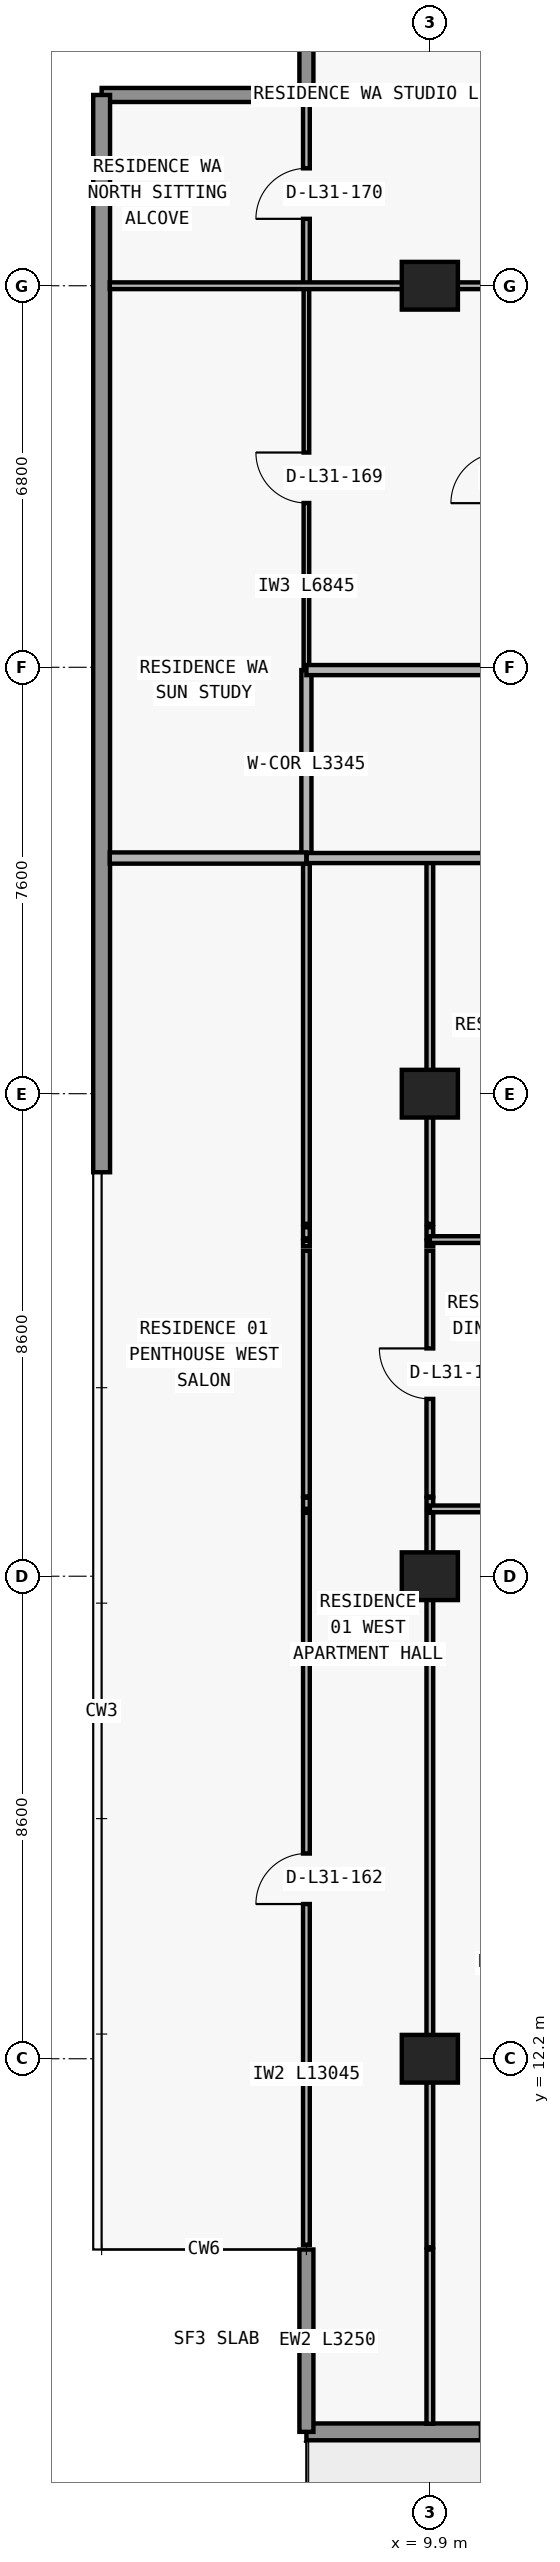
"""IFC4 building model, lengths in metres.
Left out: names, types, materials, properties, quantities, classifications, styles, units other than length and angle.
Written with IfcOpenShell. Run it as: python <this file> out.ifc"""

import sys

from ifc_helpers import new_model, si_unit, direction, frame, frame_2d, origin, origin_2d, place, context, subcontext, project, spatial, rectangle, extrude, element, fill, save


model = new_model("IFC4")
c1 = context("Model", 3, precision=1e-05, world=origin(), true_north=direction((0.0, 1.0)))
c2 = subcontext(c1, "Body", "Model", "MODEL_VIEW")
j1 = project(units=[si_unit("LENGTHUNIT", "METRE"), si_unit("PLANEANGLEUNIT", "RADIAN")], contexts=[c1])
p1 = place(None, origin())
s1 = spatial("IfcSite", under=j1, at=p1, CompositionType="ELEMENT")
p2 = place(p1, origin())
s2 = spatial("IfcBuilding", under=s1, at=p2, CompositionType="ELEMENT")
p3 = place(p2, frame((0.0, 0.0, 115.8)))
s3 = spatial("IfcBuildingStorey", under=s2, at=p3, CompositionType="ELEMENT", Elevation=115.8)
for number, where, z_axis, x_axis in (
    (1, (9.9, 12.2, 0.0), (0.0, 0.0, 1.0), (1.0, 0.0, 0.0)),
    (2, (9.9, 20.8, 0.0), (0.0, 0.0, 1.0), (1.0, 0.0, 0.0)),
    (3, (9.9, 29.4, 0.0), (0.0, 0.0, 1.0), (1.0, 0.0, 0.0)),
    (4, (9.9, 43.8, 0.0), (0.0, 0.0, 1.0), (1.0, 0.0, 0.0)),
):
    element("IfcColumn", number, at=place(p3, frame(where, z_axis=z_axis, x_axis=x_axis)), inside=s3, PredefinedType="COLUMN", context=c2, shape_type="SweptSolid", body=[
        extrude(rectangle(XDim=1.0, YDim=0.85, at=origin_2d()), origin(), (0.0, 0.0, 1.0), 3.05),
    ])
p4 = place(p3, frame((70.1, 5.55, 0.0), z_axis=(0.0, 0.0, 1.0), x_axis=(-1.0, 0.0, 0.0)))
e5 = element("IfcWall", 5, at=p4, inside=s3, PredefinedType="STANDARD", context=c2, shape_type="SweptSolid", body=[
    extrude(rectangle(XDim=62.4, YDim=0.3, at=frame_2d((31.2, 0.0))), origin(), (0.0, 0.0, 1.0), 3.05),
])
p5 = place(p4, frame((57.29, 0.0, 0.0)))
e6 = element("IfcOpeningElement", 6, at=p5, cuts=e5, PredefinedType="OPENING", context=c2, shape_type="SweptSolid", body=[
    extrude(rectangle(XDim=2.0, YDim=2.3, at=frame_2d((1.0, 1.15))), frame((0.0, 0.16, 0.0), z_axis=(0.0, -1.0, 0.0), x_axis=(1.0, 0.0, 0.0)), (0.0, 0.0, 1.0), 0.32),
])
p6 = place(p4, frame((52.61, 0.0, 0.65)))
e7 = element("IfcOpeningElement", 7, at=p6, cuts=e5, PredefinedType="OPENING", context=c2, shape_type="SweptSolid", body=[
    extrude(rectangle(XDim=2.6, YDim=1.85, at=frame_2d((1.3, 0.925))), frame((0.0, 0.16, 0.0), z_axis=(0.0, -1.0, 0.0), x_axis=(1.0, 0.0, 0.0)), (0.0, 0.0, 1.0), 0.32),
])
p7 = place(p4, frame((46.5, 0.0, 0.85)))
e8 = element("IfcOpeningElement", 8, at=p7, cuts=e5, PredefinedType="OPENING", context=c2, shape_type="SweptSolid", body=[
    extrude(rectangle(XDim=2.2, YDim=1.55, at=frame_2d((1.1, 0.775))), frame((0.0, 0.16, 0.0), z_axis=(0.0, -1.0, 0.0), x_axis=(1.0, 0.0, 0.0)), (0.0, 0.0, 1.0), 0.32),
])
p8 = place(p4, frame((40.49, 0.0, 0.0)))
e9 = element("IfcOpeningElement", 9, at=p8, cuts=e5, PredefinedType="OPENING", context=c2, shape_type="SweptSolid", body=[
    extrude(rectangle(XDim=2.0, YDim=2.3, at=frame_2d((1.0, 1.15))), frame((0.0, 0.16, 0.0), z_axis=(0.0, -1.0, 0.0), x_axis=(1.0, 0.0, 0.0)), (0.0, 0.0, 1.0), 0.32),
])
p9 = place(p4, frame((35.81, 0.0, 0.65)))
e10 = element("IfcOpeningElement", 10, at=p9, cuts=e5, PredefinedType="OPENING", context=c2, shape_type="SweptSolid", body=[
    extrude(rectangle(XDim=2.6, YDim=1.85, at=frame_2d((1.3, 0.925))), frame((0.0, 0.16, 0.0), z_axis=(0.0, -1.0, 0.0), x_axis=(1.0, 0.0, 0.0)), (0.0, 0.0, 1.0), 0.32),
])
p10 = place(p4, frame((30.1, 0.0, 0.85)))
e11 = element("IfcOpeningElement", 11, at=p10, cuts=e5, PredefinedType="OPENING", context=c2, shape_type="SweptSolid", body=[
    extrude(rectangle(XDim=2.2, YDim=1.55, at=frame_2d((1.1, 0.775))), frame((0.0, 0.16, 0.0), z_axis=(0.0, -1.0, 0.0), x_axis=(1.0, 0.0, 0.0)), (0.0, 0.0, 1.0), 0.32),
])
p11 = place(p4, frame((24.426, 0.0, 0.0)))
e12 = element("IfcOpeningElement", 12, at=p11, cuts=e5, PredefinedType="OPENING", context=c2, shape_type="SweptSolid", body=[
    extrude(rectangle(XDim=2.0, YDim=2.3, at=frame_2d((1.0, 1.15))), frame((0.0, 0.16, 0.0), z_axis=(0.0, -1.0, 0.0), x_axis=(1.0, 0.0, 0.0)), (0.0, 0.0, 1.0), 0.32),
])
p12 = place(p4, frame((20.126, 0.0, 0.85)))
e13 = element("IfcOpeningElement", 13, at=p12, cuts=e5, PredefinedType="OPENING", context=c2, shape_type="SweptSolid", body=[
    extrude(rectangle(XDim=2.2, YDim=1.55, at=frame_2d((1.1, 0.775))), frame((0.0, 0.16, 0.0), z_axis=(0.0, -1.0, 0.0), x_axis=(1.0, 0.0, 0.0)), (0.0, 0.0, 1.0), 0.32),
])
p13 = place(p4, frame((15.69, 0.0, 0.0)))
e14 = element("IfcOpeningElement", 14, at=p13, cuts=e5, PredefinedType="OPENING", context=c2, shape_type="SweptSolid", body=[
    extrude(rectangle(XDim=2.0, YDim=2.3, at=frame_2d((1.0, 1.15))), frame((0.0, 0.16, 0.0), z_axis=(0.0, -1.0, 0.0), x_axis=(1.0, 0.0, 0.0)), (0.0, 0.0, 1.0), 0.32),
])
p14 = place(p4, frame((11.59, 0.0, 0.85)))
e15 = element("IfcOpeningElement", 15, at=p14, cuts=e5, PredefinedType="OPENING", context=c2, shape_type="SweptSolid", body=[
    extrude(rectangle(XDim=1.8, YDim=1.55, at=frame_2d((0.9, 0.775))), frame((0.0, 0.16, 0.0), z_axis=(0.0, -1.0, 0.0), x_axis=(1.0, 0.0, 0.0)), (0.0, 0.0, 1.0), 0.32),
])
p15 = place(p4, frame((7.626, 0.0, 0.0)))
e16 = element("IfcOpeningElement", 16, at=p15, cuts=e5, PredefinedType="OPENING", context=c2, shape_type="SweptSolid", body=[
    extrude(rectangle(XDim=2.0, YDim=2.3, at=frame_2d((1.0, 1.15))), frame((0.0, 0.16, 0.0), z_axis=(0.0, -1.0, 0.0), x_axis=(1.0, 0.0, 0.0)), (0.0, 0.0, 1.0), 0.32),
])
p16 = place(p4, frame((3.326, 0.0, 0.85)))
e17 = element("IfcOpeningElement", 17, at=p16, cuts=e5, PredefinedType="OPENING", context=c2, shape_type="SweptSolid", body=[
    extrude(rectangle(XDim=2.2, YDim=1.55, at=frame_2d((1.1, 0.775))), frame((0.0, 0.16, 0.0), z_axis=(0.0, -1.0, 0.0), x_axis=(1.0, 0.0, 0.0)), (0.0, 0.0, 1.0), 0.32),
])
p17 = place(p3, frame((7.7, 8.8, 0.0), z_axis=(0.0, 0.0, 1.0), x_axis=(0.0, -1.0, 0.0)))
e18 = element("IfcWall", 18, at=p17, inside=s3, PredefinedType="ELEMENTEDWALL", context=c2, shape_type="SweptSolid", body=[
    extrude(rectangle(XDim=3.25, YDim=0.25, at=frame_2d((1.625, 0.0))), origin(), (0.0, 0.0, 1.0), 3.05),
])
p18 = place(p3, frame((4.05, 47.2, 0.0), z_axis=(0.0, 0.0, 1.0), x_axis=(1.0, 0.0, 0.0)))
e19 = element("IfcWall", 19, at=p18, inside=s3, PredefinedType="ELEMENTEDWALL", context=c2, shape_type="SweptSolid", body=[
    extrude(rectangle(XDim=3.65, YDim=0.25, at=frame_2d((1.825, 0.0))), origin(), (0.0, 0.0, 1.0), 3.05),
])
p19 = place(p3, frame((7.7, 47.2, 0.0), z_axis=(0.0, 0.0, 1.0), x_axis=(0.0, 1.0, 0.0)))
e20 = element("IfcWall", 20, at=p19, inside=s3, PredefinedType="ELEMENTEDWALL", context=c2, shape_type="SweptSolid", body=[
    extrude(rectangle(XDim=3.25, YDim=0.25, at=frame_2d((1.625, 0.0))), origin(), (0.0, 0.0, 1.0), 3.05),
])
p20 = place(p3, frame((4.05, 28.0, 0.0), z_axis=(0.0, 0.0, 1.0), x_axis=(0.0, 1.0, 0.0)))
e21 = element("IfcWall", 21, at=p20, inside=s3, PredefinedType="STANDARD", context=c2, shape_type="SweptSolid", body=[
    extrude(rectangle(XDim=19.2, YDim=0.3, at=frame_2d((9.6, 0.0))), origin(), (0.0, 0.0, 1.0), 3.05),
])
p21 = place(p3, frame((7.7, 8.885, 0.0), z_axis=(0.0, 0.0, 1.0), x_axis=(0.0, 1.0, 0.0)))
e22 = element("IfcWall", 22, at=p21, inside=s3, PredefinedType="PARTITIONING", context=c2, shape_type="SweptSolid", body=[
    extrude(rectangle(XDim=13.045, YDim=0.12, at=frame_2d((6.522, 0.0))), origin(), (0.0, 0.0, 1.0), 3.05),
])
p22 = place(p21, frame((6.073, 0.0, 0.0)))
e23 = element("IfcOpeningElement", 23, at=p22, cuts=e22, PredefinedType="OPENING", context=c2, shape_type="SweptSolid", body=[
    extrude(rectangle(XDim=0.9, YDim=2.15, at=frame_2d((0.45, 1.075))), frame((0.0, 0.07, 0.0), z_axis=(0.0, -1.0, 0.0), x_axis=(1.0, 0.0, 0.0)), (0.0, 0.0, 1.0), 0.14),
])
p23 = place(p3, frame((7.7, 22.0, 0.0), z_axis=(0.0, 0.0, 1.0), x_axis=(0.0, 1.0, 0.0)))
e24 = element("IfcWall", 24, at=p23, inside=s3, PredefinedType="PARTITIONING", context=c2, shape_type="SweptSolid", body=[
    extrude(rectangle(XDim=0.2, YDim=0.12, at=frame_2d((0.1, 0.0))), origin(), (0.0, 0.0, 1.0), 3.05),
])
p24 = place(p3, frame((7.7, 22.22, 0.0), z_axis=(0.0, 0.0, 1.0), x_axis=(0.0, 1.0, 0.0)))
e25 = element("IfcWall", 25, at=p24, inside=s3, PredefinedType="PARTITIONING", context=c2, shape_type="SweptSolid", body=[
    extrude(rectangle(XDim=4.38, YDim=0.12, at=frame_2d((2.19, 0.0))), origin(), (0.0, 0.0, 1.0), 3.05),
])
p25 = place(p3, frame((7.7, 26.68, 0.0), z_axis=(0.0, 0.0, 1.0), x_axis=(0.0, 1.0, 0.0)))
e26 = element("IfcWall", 26, at=p25, inside=s3, PredefinedType="PARTITIONING", context=c2, shape_type="SweptSolid", body=[
    extrude(rectangle(XDim=0.1, YDim=0.12, at=frame_2d((0.05, 0.0))), origin(), (0.0, 0.0, 1.0), 3.05),
])
p26 = place(p3, frame((7.7, 26.82, 0.0), z_axis=(0.0, 0.0, 1.0), x_axis=(0.0, 1.0, 0.0)))
e27 = element("IfcWall", 27, at=p26, inside=s3, PredefinedType="PARTITIONING", context=c2, shape_type="SweptSolid", body=[
    extrude(rectangle(XDim=0.2, YDim=0.12, at=frame_2d((0.1, 0.0))), origin(), (0.0, 0.0, 1.0), 3.05),
])
p27 = place(p3, frame((7.7, 27.08, 0.0), z_axis=(0.0, 0.0, 1.0), x_axis=(0.0, 1.0, 0.0)))
e28 = element("IfcWall", 28, at=p27, inside=s3, PredefinedType="PARTITIONING", context=c2, shape_type="SweptSolid", body=[
    extrude(rectangle(XDim=6.52, YDim=0.12, at=frame_2d((3.26, 0.0))), origin(), (0.0, 0.0, 1.0), 3.05),
])
p28 = place(p3, frame((7.7, 33.605, 0.0), z_axis=(0.0, 0.0, 1.0), x_axis=(0.0, 1.0, 0.0)))
e29 = element("IfcWall", 29, at=p28, inside=s3, PredefinedType="PARTITIONING", context=c2, shape_type="SweptSolid", body=[
    extrude(rectangle(XDim=3.345, YDim=0.18, at=frame_2d((1.672, 0.0))), origin(), (0.0, 0.0, 1.0), 3.05),
])
p29 = place(p3, frame((7.7, 36.955, 0.0), z_axis=(0.0, 0.0, 1.0), x_axis=(0.0, 1.0, 0.0)))
e30 = element("IfcWall", 30, at=p29, inside=s3, PredefinedType="MOVABLE", context=c2, shape_type="SweptSolid", body=[
    extrude(rectangle(XDim=6.845, YDim=0.1, at=frame_2d((3.422, 0.0))), origin(), (0.0, 0.0, 1.0), 3.05),
])
p30 = place(p29, frame((2.972, 0.0, 0.0)))
e31 = element("IfcOpeningElement", 31, at=p30, cuts=e30, PredefinedType="OPENING", context=c2, shape_type="SweptSolid", body=[
    extrude(rectangle(XDim=0.9, YDim=2.15, at=frame_2d((0.45, 1.075))), frame((0.0, 0.06, 0.0), z_axis=(0.0, -1.0, 0.0), x_axis=(1.0, 0.0, 0.0)), (0.0, 0.0, 1.0), 0.12),
])
p31 = place(p3, frame((7.7, 43.805, 0.0), z_axis=(0.0, 0.0, 1.0), x_axis=(0.0, 1.0, 0.0)))
e32 = element("IfcWall", 32, at=p31, inside=s3, PredefinedType="PARTITIONING", context=c2, shape_type="SweptSolid", body=[
    extrude(rectangle(XDim=3.275, YDim=0.12, at=frame_2d((1.638, 0.0))), origin(), (0.0, 0.0, 1.0), 3.05),
])
p32 = place(p31, frame((1.188, 0.0, 0.0)))
e33 = element("IfcOpeningElement", 33, at=p32, cuts=e32, PredefinedType="OPENING", context=c2, shape_type="SweptSolid", body=[
    extrude(rectangle(XDim=0.9, YDim=2.15, at=frame_2d((0.45, 1.075))), frame((0.0, 0.07, 0.0), z_axis=(0.0, -1.0, 0.0), x_axis=(1.0, 0.0, 0.0)), (0.0, 0.0, 1.0), 0.14),
])
p33 = place(p3, frame((9.9, 5.695, 0.0), z_axis=(0.0, 0.0, 1.0), x_axis=(0.0, 1.0, 0.0)))
e34 = element("IfcWall", 34, at=p33, inside=s3, PredefinedType="PARTITIONING", context=c2, shape_type="SweptSolid", body=[
    extrude(rectangle(XDim=3.105, YDim=0.12, at=frame_2d((1.552, 0.0))), origin(), (0.0, 0.0, 1.0), 3.05),
])
p34 = place(p3, frame((9.9, 8.84, 0.0), z_axis=(0.0, 0.0, 1.0), x_axis=(0.0, 1.0, 0.0)))
e35 = element("IfcWall", 35, at=p34, inside=s3, PredefinedType="PARTITIONING", context=c2, shape_type="SweptSolid", body=[
    extrude(rectangle(XDim=13.09, YDim=0.12, at=frame_2d((6.545, 0.0))), origin(), (0.0, 0.0, 1.0), 2.174),
])
p35 = place(p3, frame((9.9, 22.0, 0.0), z_axis=(0.0, 0.0, 1.0), x_axis=(0.0, 1.0, 0.0)))
e36 = element("IfcWall", 36, at=p35, inside=s3, PredefinedType="PARTITIONING", context=c2, shape_type="SweptSolid", body=[
    extrude(rectangle(XDim=0.2, YDim=0.12, at=frame_2d((0.1, 0.0))), origin(), (0.0, 0.0, 1.0), 2.174),
])
p36 = place(p3, frame((9.9, 22.22, 0.0), z_axis=(0.0, 0.0, 1.0), x_axis=(0.0, 1.0, 0.0)))
e37 = element("IfcWall", 37, at=p36, inside=s3, PredefinedType="PARTITIONING", context=c2, shape_type="SweptSolid", body=[
    extrude(rectangle(XDim=4.38, YDim=0.12, at=frame_2d((2.19, 0.0))), origin(), (0.0, 0.0, 1.0), 2.174),
])
p37 = place(p36, frame((1.74, 0.0, 0.0)))
e38 = element("IfcOpeningElement", 38, at=p37, cuts=e37, PredefinedType="OPENING", context=c2, shape_type="SweptSolid", body=[
    extrude(rectangle(XDim=0.9, YDim=2.124, at=frame_2d((0.45, 1.062))), frame((0.0, 0.07, 0.0), z_axis=(0.0, -1.0, 0.0), x_axis=(1.0, 0.0, 0.0)), (0.0, 0.0, 1.0), 0.14),
])
p38 = place(p3, frame((9.9, 26.68, 0.0), z_axis=(0.0, 0.0, 1.0), x_axis=(0.0, 1.0, 0.0)))
e39 = element("IfcWall", 39, at=p38, inside=s3, PredefinedType="PARTITIONING", context=c2, shape_type="SweptSolid", body=[
    extrude(rectangle(XDim=0.1, YDim=0.12, at=frame_2d((0.05, 0.0))), origin(), (0.0, 0.0, 1.0), 2.174),
])
p39 = place(p3, frame((9.9, 26.82, 0.0), z_axis=(0.0, 0.0, 1.0), x_axis=(0.0, 1.0, 0.0)))
e40 = element("IfcWall", 40, at=p39, inside=s3, PredefinedType="PARTITIONING", context=c2, shape_type="SweptSolid", body=[
    extrude(rectangle(XDim=0.2, YDim=0.12, at=frame_2d((0.1, 0.0))), origin(), (0.0, 0.0, 1.0), 2.174),
])
p40 = place(p3, frame((9.9, 27.08, 0.0), z_axis=(0.0, 0.0, 1.0), x_axis=(0.0, 1.0, 0.0)))
e41 = element("IfcWall", 41, at=p40, inside=s3, PredefinedType="PARTITIONING", context=c2, shape_type="SweptSolid", body=[
    extrude(rectangle(XDim=6.52, YDim=0.12, at=frame_2d((3.26, 0.0))), origin(), (0.0, 0.0, 1.0), 2.174),
])
p41 = place(p3, frame((9.9, 22.0, 0.0), z_axis=(0.0, 0.0, 1.0), x_axis=(1.0, 0.0, 0.0)))
e42 = element("IfcWall", 42, at=p41, inside=s3, PredefinedType="PARTITIONING", context=c2, shape_type="SweptSolid", body=[
    extrude(rectangle(XDim=8.35, YDim=0.12, at=frame_2d((4.175, 0.0))), origin(), (0.0, 0.0, 1.0), 3.05),
])
p42 = place(p41, frame((1.44, 0.0, 0.0)))
e43 = element("IfcOpeningElement", 43, at=p42, cuts=e42, PredefinedType="OPENING", context=c2, shape_type="SweptSolid", body=[
    extrude(rectangle(XDim=0.9, YDim=2.15, at=frame_2d((0.45, 1.075))), frame((0.0, 0.07, 0.0), z_axis=(0.0, -1.0, 0.0), x_axis=(1.0, 0.0, 0.0)), (0.0, 0.0, 1.0), 0.14),
])
p43 = place(p3, frame((9.9, 26.8, 0.0), z_axis=(0.0, 0.0, 1.0), x_axis=(1.0, 0.0, 0.0)))
e44 = element("IfcWall", 44, at=p43, inside=s3, PredefinedType="PARTITIONING", context=c2, shape_type="SweptSolid", body=[
    extrude(rectangle(XDim=8.35, YDim=0.12, at=frame_2d((4.175, 0.0))), origin(), (0.0, 0.0, 1.0), 3.05),
])
p44 = place(p43, frame((1.44, 0.0, 0.0)))
e45 = element("IfcOpeningElement", 45, at=p44, cuts=e44, PredefinedType="OPENING", context=c2, shape_type="SweptSolid", body=[
    extrude(rectangle(XDim=0.9, YDim=2.15, at=frame_2d((0.45, 1.075))), frame((0.0, 0.07, 0.0), z_axis=(0.0, -1.0, 0.0), x_axis=(1.0, 0.0, 0.0)), (0.0, 0.0, 1.0), 0.14),
])
p45 = place(p3, frame((4.195, 33.6, 0.0), z_axis=(0.0, 0.0, 1.0), x_axis=(1.0, 0.0, 0.0)))
e46 = element("IfcWall", 46, at=p45, inside=s3, PredefinedType="PARTITIONING", context=c2, shape_type="SweptSolid", body=[
    extrude(rectangle(XDim=3.505, YDim=0.2, at=frame_2d((1.752, 0.0))), origin(), (0.0, 0.0, 1.0), 3.05),
])
p46 = place(p3, frame((7.705, 33.6, 0.0), z_axis=(0.0, 0.0, 1.0), x_axis=(1.0, 0.0, 0.0)))
e47 = element("IfcWall", 47, at=p46, inside=s3, PredefinedType="PARTITIONING", context=c2, shape_type="SweptSolid", body=[
    extrude(rectangle(XDim=10.545, YDim=0.18, at=frame_2d((5.272, 0.0))), origin(), (0.0, 0.0, 1.0), 3.05),
])
p47 = place(p46, frame((5.137, 0.0, 0.0)))
e48 = element("IfcOpeningElement", 48, at=p47, cuts=e47, PredefinedType="OPENING", context=c2, shape_type="SweptSolid", body=[
    extrude(rectangle(XDim=1.0, YDim=2.2, at=frame_2d((0.5, 1.1))), frame((0.0, 0.1, 0.0), z_axis=(0.0, -1.0, 0.0), x_axis=(1.0, 0.0, 0.0)), (0.0, 0.0, 1.0), 0.2),
])
p48 = place(p3, frame((7.7, 36.95, 0.0), z_axis=(0.0, 0.0, 1.0), x_axis=(1.0, 0.0, 0.0)))
e49 = element("IfcWall", 49, at=p48, inside=s3, PredefinedType="PARTITIONING", context=c2, shape_type="SweptSolid", body=[
    extrude(rectangle(XDim=10.145, YDim=0.18, at=frame_2d((5.073, 0.0))), origin(), (0.0, 0.0, 1.0), 3.05),
])
p49 = place(p48, frame((5.188, 0.0, 0.0)))
e50 = element("IfcOpeningElement", 50, at=p49, cuts=e49, PredefinedType="OPENING", context=c2, shape_type="SweptSolid", body=[
    extrude(rectangle(XDim=1.0, YDim=2.2, at=frame_2d((0.5, 1.1))), frame((0.0, 0.1, 0.0), z_axis=(0.0, -1.0, 0.0), x_axis=(1.0, 0.0, 0.0)), (0.0, 0.0, 1.0), 0.2),
])
p50 = place(p3, frame((4.195, 43.8, 0.0), z_axis=(0.0, 0.0, 1.0), x_axis=(1.0, 0.0, 0.0)))
e51 = element("IfcWall", 51, at=p50, inside=s3, PredefinedType="PARTITIONING", context=c2, shape_type="SweptSolid", body=[
    extrude(rectangle(XDim=13.66, YDim=0.12, at=frame_2d((6.83, 0.0))), origin(), (0.0, 0.0, 1.0), 2.339),
])
p51 = place(p50, frame((8.743, 0.0, 0.0)))
e52 = element("IfcOpeningElement", 52, at=p51, cuts=e51, PredefinedType="OPENING", context=c2, shape_type="SweptSolid", body=[
    extrude(rectangle(XDim=0.9, YDim=2.15, at=frame_2d((0.45, 1.075))), frame((0.0, 0.07, 0.0), z_axis=(0.0, -1.0, 0.0), x_axis=(1.0, 0.0, 0.0)), (0.0, 0.0, 1.0), 0.14),
])
p52 = place(p50, frame((12.107, 0.0, 0.0)))
e53 = element("IfcOpeningElement", 53, at=p52, cuts=e51, PredefinedType="OPENING", context=c2, shape_type="SweptSolid", body=[
    extrude(rectangle(XDim=0.85, YDim=2.1, at=frame_2d((0.425, 1.05))), frame((0.0, 0.07, 0.0), z_axis=(0.0, -1.0, 0.0), x_axis=(1.0, 0.0, 0.0)), (0.0, 0.0, 1.0), 0.14),
])
p53 = place(p37, origin())
e54 = element("IfcDoor", 54, at=p53, inside=s3, OperationType="SINGLE_SWING_RIGHT", PredefinedType="DOOR", context=c2, shape_type="SweptSolid", body=[
    extrude(rectangle(XDim=0.9, YDim=2.124, at=frame_2d((0.45, 1.062))), frame((0.0, 0.025, 0.0), z_axis=(0.0, -1.0, 0.0), x_axis=(1.0, 0.0, 0.0)), (0.0, 0.0, 1.0), 0.05),
])
fill(e38, e54)
p54 = place(p22, origin())
e55 = element("IfcDoor", 55, at=p54, inside=s3, OperationType="SINGLE_SWING_LEFT", PredefinedType="DOOR", context=c2, shape_type="SweptSolid", body=[
    extrude(rectangle(XDim=0.9, YDim=2.15, at=frame_2d((0.45, 1.075))), frame((0.0, 0.025, 0.0), z_axis=(0.0, -1.0, 0.0), x_axis=(1.0, 0.0, 0.0)), (0.0, 0.0, 1.0), 0.05),
])
fill(e23, e55)
p55 = place(p30, origin())
e56 = element("IfcDoor", 56, at=p55, inside=s3, OperationType="SINGLE_SWING_RIGHT", PredefinedType="DOOR", context=c2, shape_type="SweptSolid", body=[
    extrude(rectangle(XDim=0.9, YDim=2.15, at=frame_2d((0.45, 1.075))), frame((0.0, 0.025, 0.0), z_axis=(0.0, -1.0, 0.0), x_axis=(1.0, 0.0, 0.0)), (0.0, 0.0, 1.0), 0.05),
])
fill(e31, e56)
p56 = place(p32, origin())
e57 = element("IfcDoor", 57, at=p56, inside=s3, OperationType="SINGLE_SWING_LEFT", PredefinedType="DOOR", context=c2, shape_type="SweptSolid", body=[
    extrude(rectangle(XDim=0.9, YDim=2.15, at=frame_2d((0.45, 1.075))), frame((0.0, 0.025, 0.0), z_axis=(0.0, -1.0, 0.0), x_axis=(1.0, 0.0, 0.0)), (0.0, 0.0, 1.0), 0.05),
])
fill(e33, e57)
save(model, sys.argv[1])
